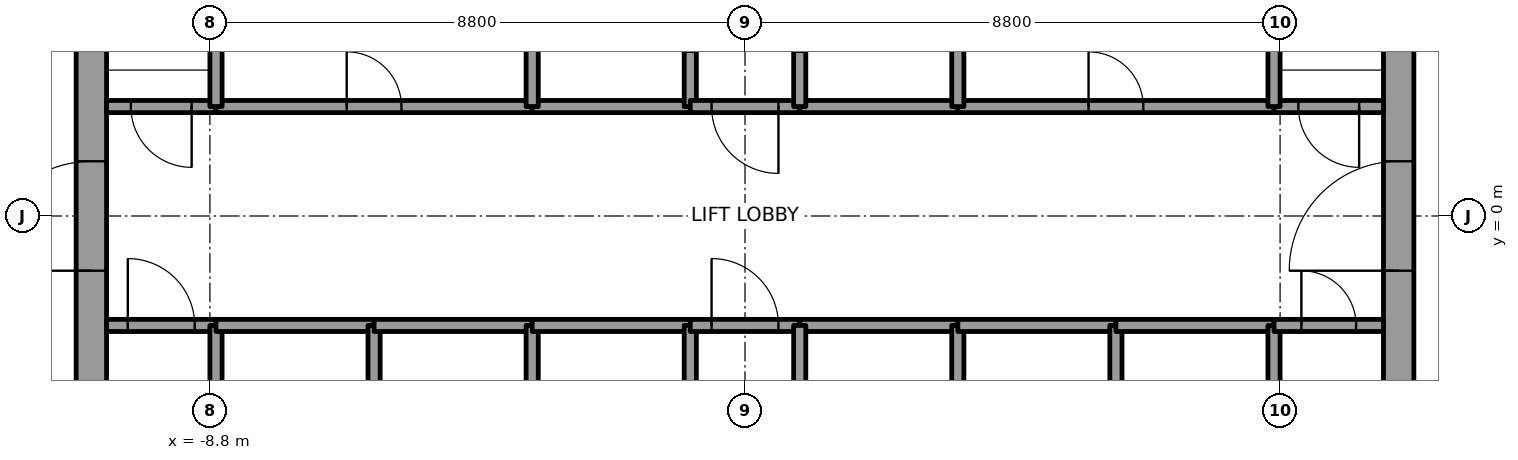
"""IFC4 building model, lengths in metres.
Left out: names, types, materials, properties, quantities, classifications, styles, units other than length and angle.
Written with IfcOpenShell. Run it as: python <this file> out.ifc"""

import sys

from ifc_helpers import new_model, si_unit, direction, frame, frame_2d, origin, place, context, subcontext, project, spatial, rectangle, extrude, element, fill, save


model = new_model("IFC4")
c1 = context("Model", 3, precision=1e-05, world=origin(), true_north=direction((0.0, 1.0)))
c2 = subcontext(c1, "Body", "Model", "MODEL_VIEW")
j1 = project(units=[si_unit("LENGTHUNIT", "METRE"), si_unit("PLANEANGLEUNIT", "RADIAN")], contexts=[c1])
p1 = place(None, origin())
s1 = spatial("IfcSite", under=j1, at=p1, CompositionType="ELEMENT")
p2 = place(p1, origin())
s2 = spatial("IfcBuilding", under=s1, at=p2, CompositionType="ELEMENT")
p3 = place(p2, frame((0.0, 0.0, 330.4)))
s3 = spatial("IfcBuildingStorey", under=s2, at=p3, CompositionType="ELEMENT", Elevation=330.4)
p4 = place(p3, frame((-10.75, -7.5, 0.0), z_axis=(0.0, 0.0, 1.0), x_axis=(0.0, 1.0, 0.0)))
e1 = element("IfcWall", 1, at=p4, inside=s3, PredefinedType="SHEAR", context=c2, shape_type="SweptSolid", body=[
    extrude(rectangle(XDim=15.0, YDim=0.5, at=frame_2d((7.5, 0.0))), origin(), (0.0, 0.0, 1.0), 9.0),
])
p5 = place(p4, frame((6.6, 0.0, 0.0)))
e2 = element("IfcOpeningElement", 2, at=p5, cuts=e1, PredefinedType="OPENING", context=c2, shape_type="SweptSolid", body=[
    extrude(rectangle(XDim=1.8, YDim=2.1, at=frame_2d((0.9, 1.05))), frame((0.0, 0.25, 0.0), z_axis=(0.0, -1.0, 0.0), x_axis=(1.0, 0.0, 0.0)), (0.0, 0.0, 1.0), 0.5),
])
p6 = place(p3, frame((10.75, -7.5, 0.0), z_axis=(0.0, 0.0, 1.0), x_axis=(0.0, 1.0, 0.0)))
e3 = element("IfcWall", 3, at=p6, inside=s3, PredefinedType="SHEAR", context=c2, shape_type="SweptSolid", body=[
    extrude(rectangle(XDim=15.0, YDim=0.5, at=frame_2d((7.5, 0.0))), origin(), (0.0, 0.0, 1.0), 9.0),
])
p7 = place(p6, frame((6.6, 0.0, 0.0)))
e4 = element("IfcOpeningElement", 4, at=p7, cuts=e3, PredefinedType="OPENING", context=c2, shape_type="SweptSolid", body=[
    extrude(rectangle(XDim=1.8, YDim=2.1, at=frame_2d((0.9, 1.05))), frame((0.0, 0.25, 0.0), z_axis=(0.0, -1.0, 0.0), x_axis=(1.0, 0.0, 0.0)), (0.0, 0.0, 1.0), 0.5),
])
p8 = place(p3, frame((-10.5, -1.8, 0.0), z_axis=(0.0, 0.0, 1.0), x_axis=(1.0, 0.0, 0.0)))
e5 = element("IfcWall", 5, at=p8, inside=s3, PredefinedType="SOLIDWALL", context=c2, shape_type="SweptSolid", body=[
    extrude(rectangle(XDim=1.8, YDim=0.2, at=frame_2d((0.9, 0.0))), origin(), (0.0, 0.0, 1.0), 8.85),
])
p9 = place(p8, frame((0.35, 0.0, 0.0)))
e6 = element("IfcOpeningElement", 6, at=p9, cuts=e5, PredefinedType="OPENING", context=c2, shape_type="SweptSolid", body=[
    extrude(rectangle(XDim=1.1, YDim=2.1, at=frame_2d((0.55, 1.05))), frame((0.0, 0.1, 0.0), z_axis=(0.0, -1.0, 0.0), x_axis=(1.0, 0.0, 0.0)), (0.0, 0.0, 1.0), 0.2),
])
p10 = place(p3, frame((-8.7, 1.8, 0.0), z_axis=(0.0, 0.0, 1.0), x_axis=(-1.0, 0.0, 0.0)))
e7 = element("IfcWall", 7, at=p10, inside=s3, PredefinedType="SOLIDWALL", context=c2, shape_type="SweptSolid", body=[
    extrude(rectangle(XDim=1.8, YDim=0.2, at=frame_2d((0.9, 0.0))), origin(), (0.0, 0.0, 1.0), 8.85),
])
p11 = place(p10, frame((0.4, 0.0, 0.0)))
e8 = element("IfcOpeningElement", 8, at=p11, cuts=e7, PredefinedType="OPENING", context=c2, shape_type="SweptSolid", body=[
    extrude(rectangle(XDim=1.0, YDim=2.1, at=frame_2d((0.5, 1.05))), frame((0.0, 0.1, 0.0), z_axis=(0.0, -1.0, 0.0), x_axis=(1.0, 0.0, 0.0)), (0.0, 0.0, 1.0), 0.2),
])
p12 = place(p3, frame((-8.7, -4.6, 0.0), z_axis=(0.0, 0.0, 1.0), x_axis=(0.0, 1.0, 0.0)))
e9 = element("IfcWall", 9, at=p12, inside=s3, PredefinedType="SOLIDWALL", context=c2, shape_type="SweptSolid", body=[
    extrude(rectangle(XDim=2.8, YDim=0.2, at=frame_2d((1.4, 0.0))), origin(), (0.0, 0.0, 1.0), 8.85),
])
p13 = place(p3, frame((-8.7, -1.8, 0.0), z_axis=(0.0, 0.0, 1.0), x_axis=(1.0, 0.0, 0.0)))
e10 = element("IfcWall", 10, at=p13, inside=s3, PredefinedType="SOLIDWALL", context=c2, shape_type="SweptSolid", body=[
    extrude(rectangle(XDim=2.6, YDim=0.2, at=frame_2d((1.3, 0.0))), origin(), (0.0, 0.0, 1.0), 8.85),
])
p14 = place(p3, frame((-8.7, 1.8, 0.0), z_axis=(0.0, 0.0, 1.0), x_axis=(1.0, 0.0, 0.0)))
e11 = element("IfcWall", 11, at=p14, inside=s3, PredefinedType="SOLIDWALL", context=c2, shape_type="SweptSolid", body=[
    extrude(rectangle(XDim=5.2, YDim=0.2, at=frame_2d((2.6, 0.0))), origin(), (0.0, 0.0, 1.0), 8.85),
])
p15 = place(p14, frame((2.15, 0.0, 0.0)))
e12 = element("IfcOpeningElement", 12, at=p15, cuts=e11, PredefinedType="OPENING", context=c2, shape_type="SweptSolid", body=[
    extrude(rectangle(XDim=0.9, YDim=2.1, at=frame_2d((0.45, 1.05))), frame((0.0, 0.1, 0.0), z_axis=(0.0, -1.0, 0.0), x_axis=(1.0, 0.0, 0.0)), (0.0, 0.0, 1.0), 0.2),
])
for number, where, z_axis, x_axis in (
    (13, (-8.7, 4.6, 0.0), (0.0, 0.0, 1.0), (0.0, -1.0, 0.0)),
    (14, (-6.1, -4.6, 0.0), (0.0, 0.0, 1.0), (0.0, 1.0, 0.0)),
):
    element("IfcWall", number, at=place(p3, frame(where, z_axis=z_axis, x_axis=x_axis)), inside=s3, PredefinedType="SOLIDWALL", context=c2, shape_type="SweptSolid", body=[
        extrude(rectangle(XDim=2.8, YDim=0.2, at=frame_2d((1.4, 0.0))), origin(), (0.0, 0.0, 1.0), 8.85),
    ])
p16 = place(p3, frame((-6.1, -1.8, 0.0), z_axis=(0.0, 0.0, 1.0), x_axis=(1.0, 0.0, 0.0)))
e15 = element("IfcWall", 15, at=p16, inside=s3, PredefinedType="SOLIDWALL", context=c2, shape_type="SweptSolid", body=[
    extrude(rectangle(XDim=2.6, YDim=0.2, at=frame_2d((1.3, 0.0))), origin(), (0.0, 0.0, 1.0), 8.85),
])
p17 = place(p3, frame((-3.5, -4.6, 0.0), z_axis=(0.0, 0.0, 1.0), x_axis=(0.0, 1.0, 0.0)))
e16 = element("IfcWall", 16, at=p17, inside=s3, PredefinedType="SOLIDWALL", context=c2, shape_type="SweptSolid", body=[
    extrude(rectangle(XDim=2.8, YDim=0.2, at=frame_2d((1.4, 0.0))), origin(), (0.0, 0.0, 1.0), 8.85),
])
for number, where, z_axis, x_axis in (
    (17, (-3.5, -1.8, 0.0), (0.0, 0.0, 1.0), (1.0, 0.0, 0.0)),
    (18, (-0.9, 1.8, 0.0), (0.0, 0.0, 1.0), (-1.0, 0.0, 0.0)),
):
    element("IfcWall", number, at=place(p3, frame(where, z_axis=z_axis, x_axis=x_axis)), inside=s3, PredefinedType="SOLIDWALL", context=c2, shape_type="SweptSolid", body=[
        extrude(rectangle(XDim=2.6, YDim=0.2, at=frame_2d((1.3, 0.0))), origin(), (0.0, 0.0, 1.0), 8.85),
    ])
p18 = place(p3, frame((-3.5, 1.8, 0.0), z_axis=(0.0, 0.0, 1.0), x_axis=(0.0, 1.0, 0.0)))
e19 = element("IfcWall", 19, at=p18, inside=s3, PredefinedType="SOLIDWALL", context=c2, shape_type="SweptSolid", body=[
    extrude(rectangle(XDim=2.8, YDim=0.2, at=frame_2d((1.4, 0.0))), origin(), (0.0, 0.0, 1.0), 8.85),
])
p19 = place(p3, frame((-0.9, 1.8, 0.0), z_axis=(0.0, 0.0, 1.0), x_axis=(0.0, 1.0, 0.0)))
e20 = element("IfcWall", 20, at=p19, inside=s3, PredefinedType="SOLIDWALL", context=c2, shape_type="SweptSolid", body=[
    extrude(rectangle(XDim=3.0, YDim=0.2, at=frame_2d((1.5, 0.0))), origin(), (0.0, 0.0, 1.0), 8.85),
])
p20 = place(p19, frame((0.9, 0.0, 0.0)))
e21 = element("IfcOpeningElement", 21, at=p20, cuts=e20, PredefinedType="OPENING", context=c2, shape_type="SweptSolid", body=[
    extrude(rectangle(XDim=1.2, YDim=2.1, at=frame_2d((0.6, 1.05))), frame((0.0, 0.1, 0.0), z_axis=(0.0, -1.0, 0.0), x_axis=(1.0, 0.0, 0.0)), (0.0, 0.0, 1.0), 0.2),
])
p21 = place(p3, frame((-0.9, -4.6, 0.0), z_axis=(0.0, 0.0, 1.0), x_axis=(0.0, 1.0, 0.0)))
e22 = element("IfcWall", 22, at=p21, inside=s3, PredefinedType="SOLIDWALL", context=c2, shape_type="SweptSolid", body=[
    extrude(rectangle(XDim=2.8, YDim=0.2, at=frame_2d((1.4, 0.0))), origin(), (0.0, 0.0, 1.0), 8.85),
])
p22 = place(p3, frame((-0.9, -1.8, 0.0), z_axis=(0.0, 0.0, 1.0), x_axis=(1.0, 0.0, 0.0)))
e23 = element("IfcWall", 23, at=p22, inside=s3, PredefinedType="SOLIDWALL", context=c2, shape_type="SweptSolid", body=[
    extrude(rectangle(XDim=1.8, YDim=0.2, at=frame_2d((0.9, 0.0))), origin(), (0.0, 0.0, 1.0), 8.85),
])
p23 = place(p22, frame((0.35, 0.0, 0.0)))
e24 = element("IfcOpeningElement", 24, at=p23, cuts=e23, PredefinedType="OPENING", context=c2, shape_type="SweptSolid", body=[
    extrude(rectangle(XDim=1.1, YDim=2.1, at=frame_2d((0.55, 1.05))), frame((0.0, 0.1, 0.0), z_axis=(0.0, -1.0, 0.0), x_axis=(1.0, 0.0, 0.0)), (0.0, 0.0, 1.0), 0.2),
])
p24 = place(p3, frame((0.9, 1.8, 0.0), z_axis=(0.0, 0.0, 1.0), x_axis=(-1.0, 0.0, 0.0)))
e25 = element("IfcWall", 25, at=p24, inside=s3, PredefinedType="SOLIDWALL", context=c2, shape_type="SweptSolid", body=[
    extrude(rectangle(XDim=1.8, YDim=0.2, at=frame_2d((0.9, 0.0))), origin(), (0.0, 0.0, 1.0), 8.85),
])
p25 = place(p24, frame((0.35, 0.0, 0.0)))
e26 = element("IfcOpeningElement", 26, at=p25, cuts=e25, PredefinedType="OPENING", context=c2, shape_type="SweptSolid", body=[
    extrude(rectangle(XDim=1.1, YDim=2.1, at=frame_2d((0.55, 1.05))), frame((0.0, 0.1, 0.0), z_axis=(0.0, -1.0, 0.0), x_axis=(1.0, 0.0, 0.0)), (0.0, 0.0, 1.0), 0.2),
])
p26 = place(p3, frame((0.9, -1.8, 0.0), z_axis=(0.0, 0.0, 1.0), x_axis=(1.0, 0.0, 0.0)))
e27 = element("IfcWall", 27, at=p26, inside=s3, PredefinedType="SOLIDWALL", context=c2, shape_type="SweptSolid", body=[
    extrude(rectangle(XDim=2.6, YDim=0.2, at=frame_2d((1.3, 0.0))), origin(), (0.0, 0.0, 1.0), 8.85),
])
p27 = place(p3, frame((0.9, -1.8, 0.0), z_axis=(0.0, 0.0, 1.0), x_axis=(0.0, -1.0, 0.0)))
e28 = element("IfcWall", 28, at=p27, inside=s3, PredefinedType="SOLIDWALL", context=c2, shape_type="SweptSolid", body=[
    extrude(rectangle(XDim=2.8, YDim=0.2, at=frame_2d((1.4, 0.0))), origin(), (0.0, 0.0, 1.0), 8.85),
])
p28 = place(p3, frame((3.5, 1.8, 0.0), z_axis=(0.0, 0.0, 1.0), x_axis=(-1.0, 0.0, 0.0)))
e29 = element("IfcWall", 29, at=p28, inside=s3, PredefinedType="SOLIDWALL", context=c2, shape_type="SweptSolid", body=[
    extrude(rectangle(XDim=2.6, YDim=0.2, at=frame_2d((1.3, 0.0))), origin(), (0.0, 0.0, 1.0), 8.85),
])
p29 = place(p3, frame((0.9, 4.8, 0.0), z_axis=(0.0, 0.0, 1.0), x_axis=(0.0, -1.0, 0.0)))
e30 = element("IfcWall", 30, at=p29, inside=s3, PredefinedType="SOLIDWALL", context=c2, shape_type="SweptSolid", body=[
    extrude(rectangle(XDim=3.0, YDim=0.2, at=frame_2d((1.5, 0.0))), origin(), (0.0, 0.0, 1.0), 8.85),
])
p30 = place(p29, frame((0.9, 0.0, 0.0)))
e31 = element("IfcOpeningElement", 31, at=p30, cuts=e30, PredefinedType="OPENING", context=c2, shape_type="SweptSolid", body=[
    extrude(rectangle(XDim=1.2, YDim=2.1, at=frame_2d((0.6, 1.05))), frame((0.0, 0.1, 0.0), z_axis=(0.0, -1.0, 0.0), x_axis=(1.0, 0.0, 0.0)), (0.0, 0.0, 1.0), 0.2),
])
p31 = place(p3, frame((3.5, -4.6, 0.0), z_axis=(0.0, 0.0, 1.0), x_axis=(0.0, 1.0, 0.0)))
e32 = element("IfcWall", 32, at=p31, inside=s3, PredefinedType="SOLIDWALL", context=c2, shape_type="SweptSolid", body=[
    extrude(rectangle(XDim=2.8, YDim=0.2, at=frame_2d((1.4, 0.0))), origin(), (0.0, 0.0, 1.0), 8.85),
])
p32 = place(p3, frame((3.5, -1.8, 0.0), z_axis=(0.0, 0.0, 1.0), x_axis=(1.0, 0.0, 0.0)))
e33 = element("IfcWall", 33, at=p32, inside=s3, PredefinedType="SOLIDWALL", context=c2, shape_type="SweptSolid", body=[
    extrude(rectangle(XDim=2.6, YDim=0.2, at=frame_2d((1.3, 0.0))), origin(), (0.0, 0.0, 1.0), 8.85),
])
p33 = place(p3, frame((3.5, 1.8, 0.0), z_axis=(0.0, 0.0, 1.0), x_axis=(1.0, 0.0, 0.0)))
e34 = element("IfcWall", 34, at=p33, inside=s3, PredefinedType="SOLIDWALL", context=c2, shape_type="SweptSolid", body=[
    extrude(rectangle(XDim=5.2, YDim=0.2, at=frame_2d((2.6, 0.0))), origin(), (0.0, 0.0, 1.0), 8.85),
])
p34 = place(p33, frame((2.15, 0.0, 0.0)))
e35 = element("IfcOpeningElement", 35, at=p34, cuts=e34, PredefinedType="OPENING", context=c2, shape_type="SweptSolid", body=[
    extrude(rectangle(XDim=0.9, YDim=2.1, at=frame_2d((0.45, 1.05))), frame((0.0, 0.1, 0.0), z_axis=(0.0, -1.0, 0.0), x_axis=(1.0, 0.0, 0.0)), (0.0, 0.0, 1.0), 0.2),
])
for number, where, z_axis, x_axis in (
    (36, (3.5, 4.6, 0.0), (0.0, 0.0, 1.0), (0.0, -1.0, 0.0)),
    (37, (6.1, -4.6, 0.0), (0.0, 0.0, 1.0), (0.0, 1.0, 0.0)),
):
    element("IfcWall", number, at=place(p3, frame(where, z_axis=z_axis, x_axis=x_axis)), inside=s3, PredefinedType="SOLIDWALL", context=c2, shape_type="SweptSolid", body=[
        extrude(rectangle(XDim=2.8, YDim=0.2, at=frame_2d((1.4, 0.0))), origin(), (0.0, 0.0, 1.0), 8.85),
    ])
p35 = place(p3, frame((6.1, -1.8, 0.0), z_axis=(0.0, 0.0, 1.0), x_axis=(1.0, 0.0, 0.0)))
e38 = element("IfcWall", 38, at=p35, inside=s3, PredefinedType="SOLIDWALL", context=c2, shape_type="SweptSolid", body=[
    extrude(rectangle(XDim=2.6, YDim=0.2, at=frame_2d((1.3, 0.0))), origin(), (0.0, 0.0, 1.0), 8.85),
])
p36 = place(p3, frame((8.7, -1.8, 0.0), z_axis=(0.0, 0.0, 1.0), x_axis=(0.0, -1.0, 0.0)))
e39 = element("IfcWall", 39, at=p36, inside=s3, PredefinedType="SOLIDWALL", context=c2, shape_type="SweptSolid", body=[
    extrude(rectangle(XDim=2.8, YDim=0.2, at=frame_2d((1.4, 0.0))), origin(), (0.0, 0.0, 1.0), 8.85),
])
p37 = place(p3, frame((8.7, -1.8, 0.0), z_axis=(0.0, 0.0, 1.0), x_axis=(1.0, 0.0, 0.0)))
e40 = element("IfcWall", 40, at=p37, inside=s3, PredefinedType="SOLIDWALL", context=c2, shape_type="SweptSolid", body=[
    extrude(rectangle(XDim=1.8, YDim=0.2, at=frame_2d((0.9, 0.0))), origin(), (0.0, 0.0, 1.0), 8.85),
])
p38 = place(p37, frame((0.45, 0.0, 0.0)))
e41 = element("IfcOpeningElement", 41, at=p38, cuts=e40, PredefinedType="OPENING", context=c2, shape_type="SweptSolid", body=[
    extrude(rectangle(XDim=0.9, YDim=2.1, at=frame_2d((0.45, 1.05))), frame((0.0, 0.1, 0.0), z_axis=(0.0, -1.0, 0.0), x_axis=(1.0, 0.0, 0.0)), (0.0, 0.0, 1.0), 0.2),
])
p39 = place(p3, frame((10.5, 1.8, 0.0), z_axis=(0.0, 0.0, 1.0), x_axis=(-1.0, 0.0, 0.0)))
e42 = element("IfcWall", 42, at=p39, inside=s3, PredefinedType="SOLIDWALL", context=c2, shape_type="SweptSolid", body=[
    extrude(rectangle(XDim=1.8, YDim=0.2, at=frame_2d((0.9, 0.0))), origin(), (0.0, 0.0, 1.0), 8.85),
])
p40 = place(p39, frame((0.4, 0.0, 0.0)))
e43 = element("IfcOpeningElement", 43, at=p40, cuts=e42, PredefinedType="OPENING", context=c2, shape_type="SweptSolid", body=[
    extrude(rectangle(XDim=1.0, YDim=2.1, at=frame_2d((0.5, 1.05))), frame((0.0, 0.1, 0.0), z_axis=(0.0, -1.0, 0.0), x_axis=(1.0, 0.0, 0.0)), (0.0, 0.0, 1.0), 0.2),
])
p41 = place(p3, frame((8.7, 1.8, 0.0), z_axis=(0.0, 0.0, 1.0), x_axis=(0.0, 1.0, 0.0)))
e44 = element("IfcWall", 44, at=p41, inside=s3, PredefinedType="SOLIDWALL", context=c2, shape_type="SweptSolid", body=[
    extrude(rectangle(XDim=2.8, YDim=0.2, at=frame_2d((1.4, 0.0))), origin(), (0.0, 0.0, 1.0), 8.85),
])
p42 = place(p3, frame((-23.068, -1.032, 0.0), z_axis=(0.0, 0.0, 1.0), x_axis=(0.866022206254, -0.500005538244, 0.0)))
e45 = element("IfcWall", 45, at=p42, inside=s3, PredefinedType="PARTITIONING", context=c2, shape_type="SweptSolid", body=[
    extrude(rectangle(XDim=13.935, YDim=0.15, at=frame_2d((6.968, 0.0))), origin(), (0.0, 0.0, 1.0), 8.083),
])
p43 = place(p42, frame((9.053, 0.0, 0.0)))
e46 = element("IfcOpeningElement", 46, at=p43, cuts=e45, PredefinedType="OPENING", context=c2, shape_type="SweptSolid", body=[
    extrude(rectangle(XDim=1.5, YDim=2.1, at=frame_2d((0.75, 1.05))), frame((0.0, 0.075, 0.0), z_axis=(0.0, -1.0, 0.0), x_axis=(1.0, 0.0, 0.0)), (0.0, 0.0, 1.0), 0.15),
])
p44 = place(p3, frame((11.0, -8.0, 0.0), z_axis=(0.0, 0.0, 1.0), x_axis=(0.866022206254, 0.500005538244, 0.0)))
e47 = element("IfcWall", 47, at=p44, inside=s3, PredefinedType="PARTITIONING", context=c2, shape_type="SweptSolid", body=[
    extrude(rectangle(XDim=13.935, YDim=0.15, at=frame_2d((6.968, 0.0))), origin(), (0.0, 0.0, 1.0), 8.083),
])
p45 = place(p44, frame((3.632, 0.0, 0.0)))
e48 = element("IfcOpeningElement", 48, at=p45, cuts=e47, PredefinedType="OPENING", context=c2, shape_type="SweptSolid", body=[
    extrude(rectangle(XDim=1.0, YDim=2.1, at=frame_2d((0.5, 1.05))), frame((0.0, 0.075, 0.0), z_axis=(0.0, -1.0, 0.0), x_axis=(1.0, 0.0, 0.0)), (0.0, 0.0, 1.0), 0.15),
])
p46 = place(p9, origin())
e49 = element("IfcDoor", 49, at=p46, inside=s3, OperationType="SINGLE_SWING_RIGHT", PredefinedType="DOOR", context=c2, shape_type="SweptSolid", body=[
    extrude(rectangle(XDim=1.1, YDim=2.1, at=frame_2d((0.55, 1.05))), frame((0.0, 0.025, 0.0), z_axis=(0.0, -1.0, 0.0), x_axis=(1.0, 0.0, 0.0)), (0.0, 0.0, 1.0), 0.05),
])
fill(e6, e49)
p47 = place(p25, origin())
e50 = element("IfcDoor", 50, at=p47, inside=s3, OperationType="SINGLE_SWING_RIGHT", PredefinedType="DOOR", context=c2, shape_type="SweptSolid", body=[
    extrude(rectangle(XDim=1.1, YDim=2.1, at=frame_2d((0.55, 1.05))), frame((0.0, 0.025, 0.0), z_axis=(0.0, -1.0, 0.0), x_axis=(1.0, 0.0, 0.0)), (0.0, 0.0, 1.0), 0.05),
])
fill(e26, e50)
p48 = place(p23, origin())
e51 = element("IfcDoor", 51, at=p48, inside=s3, OperationType="SINGLE_SWING_LEFT", PredefinedType="DOOR", context=c2, shape_type="SweptSolid", body=[
    extrude(rectangle(XDim=1.1, YDim=2.1, at=frame_2d((0.55, 1.05))), frame((0.0, 0.025, 0.0), z_axis=(0.0, -1.0, 0.0), x_axis=(1.0, 0.0, 0.0)), (0.0, 0.0, 1.0), 0.05),
])
fill(e24, e51)
p49 = place(p11, origin())
e52 = element("IfcDoor", 52, at=p49, inside=s3, OperationType="SINGLE_SWING_LEFT", PredefinedType="DOOR", context=c2, shape_type="SweptSolid", body=[
    extrude(rectangle(XDim=1.0, YDim=2.1, at=frame_2d((0.5, 1.05))), frame((0.0, 0.025, 0.0), z_axis=(0.0, -1.0, 0.0), x_axis=(1.0, 0.0, 0.0)), (0.0, 0.0, 1.0), 0.05),
])
fill(e8, e52)
p50 = place(p40, origin())
e53 = element("IfcDoor", 53, at=p50, inside=s3, OperationType="SINGLE_SWING_RIGHT", PredefinedType="DOOR", context=c2, shape_type="SweptSolid", body=[
    extrude(rectangle(XDim=1.0, YDim=2.1, at=frame_2d((0.5, 1.05))), frame((0.0, 0.025, 0.0), z_axis=(0.0, -1.0, 0.0), x_axis=(1.0, 0.0, 0.0)), (0.0, 0.0, 1.0), 0.05),
])
fill(e43, e53)
p51 = place(p34, origin())
e54 = element("IfcDoor", 54, at=p51, inside=s3, OperationType="SINGLE_SWING_RIGHT", PredefinedType="DOOR", context=c2, shape_type="SweptSolid", body=[
    extrude(rectangle(XDim=0.9, YDim=2.1, at=frame_2d((0.45, 1.05))), frame((0.0, 0.025, 0.0), z_axis=(0.0, -1.0, 0.0), x_axis=(1.0, 0.0, 0.0)), (0.0, 0.0, 1.0), 0.05),
])
fill(e35, e54)
p52 = place(p15, origin())
e55 = element("IfcDoor", 55, at=p52, inside=s3, OperationType="SINGLE_SWING_LEFT", PredefinedType="DOOR", context=c2, shape_type="SweptSolid", body=[
    extrude(rectangle(XDim=0.9, YDim=2.1, at=frame_2d((0.45, 1.05))), frame((0.0, 0.025, 0.0), z_axis=(0.0, -1.0, 0.0), x_axis=(1.0, 0.0, 0.0)), (0.0, 0.0, 1.0), 0.05),
])
fill(e12, e55)
p53 = place(p38, origin())
e56 = element("IfcDoor", 56, at=p53, inside=s3, OperationType="SINGLE_SWING_LEFT", PredefinedType="DOOR", context=c2, shape_type="SweptSolid", body=[
    extrude(rectangle(XDim=0.9, YDim=2.1, at=frame_2d((0.45, 1.05))), frame((0.0, 0.025, 0.0), z_axis=(0.0, -1.0, 0.0), x_axis=(1.0, 0.0, 0.0)), (0.0, 0.0, 1.0), 0.05),
])
fill(e41, e56)
p54 = place(p5, origin())
e57 = element("IfcDoor", 57, at=p54, inside=s3, OperationType="DOUBLE_DOOR_SINGLE_SWING", PredefinedType="DOOR", context=c2, shape_type="SweptSolid", body=[
    extrude(rectangle(XDim=1.8, YDim=2.1, at=frame_2d((0.9, 1.05))), frame((0.0, 0.025, 0.0), z_axis=(0.0, -1.0, 0.0), x_axis=(1.0, 0.0, 0.0)), (0.0, 0.0, 1.0), 0.05),
])
fill(e2, e57)
p55 = place(p7, origin())
e58 = element("IfcDoor", 58, at=p55, inside=s3, OperationType="DOUBLE_DOOR_SINGLE_SWING", PredefinedType="DOOR", context=c2, shape_type="SweptSolid", body=[
    extrude(rectangle(XDim=1.8, YDim=2.1, at=frame_2d((0.9, 1.05))), frame((0.0, 0.025, 0.0), z_axis=(0.0, -1.0, 0.0), x_axis=(1.0, 0.0, 0.0)), (0.0, 0.0, 1.0), 0.05),
])
fill(e4, e58)
save(model, sys.argv[1])
